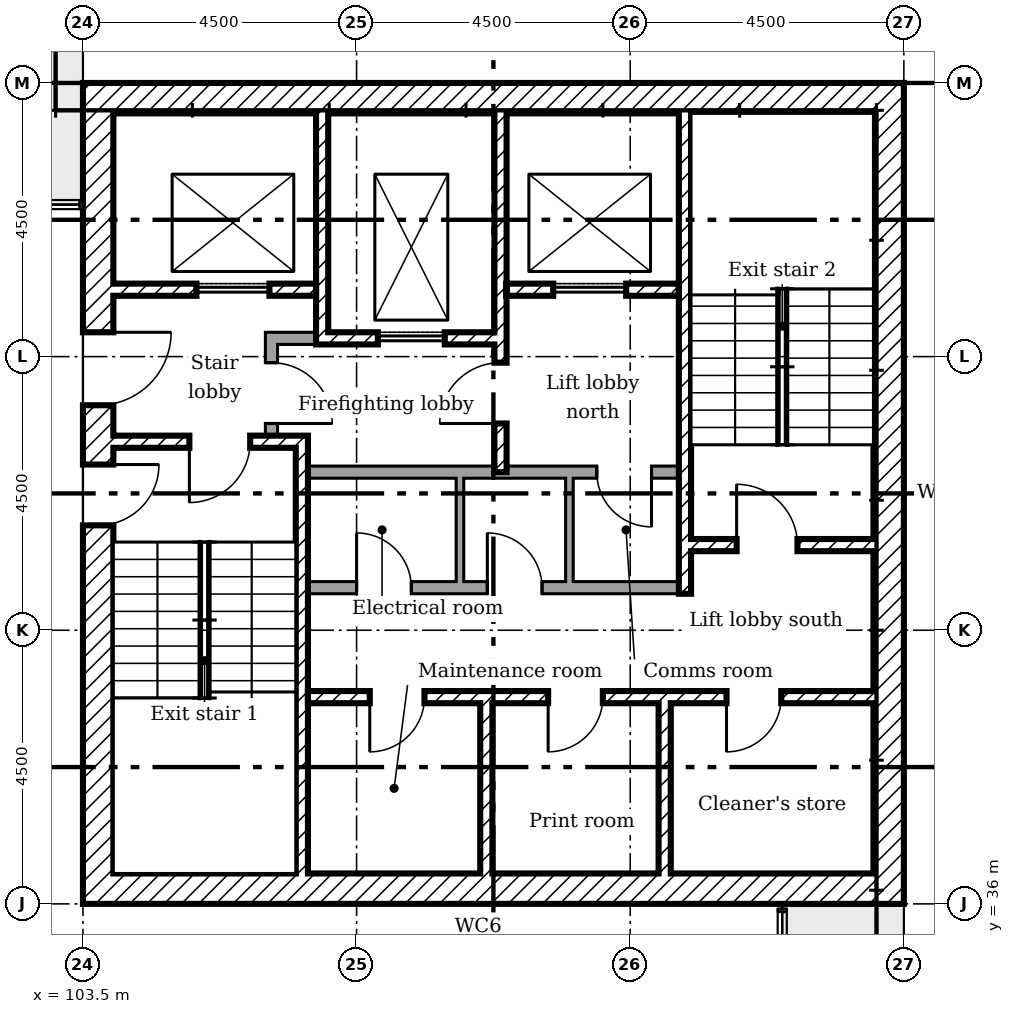
"""IFC4 building model, lengths in metres.
Left out: names, types, materials, properties, quantities, classifications, styles, units other than length and angle.
Written with IfcOpenShell. Run it as: python <this file> out.ifc"""

import sys

from ifc_helpers import new_model, si_unit, direction, frame, frame_2d, origin, place, context, subcontext, project, spatial, rectangle, extrude, element, fill, save


model = new_model("IFC4")
c1 = context("Model", 3, precision=1e-05, world=origin(), true_north=direction((0.0, 1.0)))
c2 = subcontext(c1, "Body", "Model", "MODEL_VIEW")
j1 = project(units=[si_unit("LENGTHUNIT", "METRE"), si_unit("PLANEANGLEUNIT", "RADIAN")], contexts=[c1])
p1 = place(None, origin())
s1 = spatial("IfcSite", under=j1, at=p1, CompositionType="ELEMENT")
p2 = place(p1, origin())
s2 = spatial("IfcBuilding", under=s1, at=p2, CompositionType="ELEMENT")
p3 = place(p2, frame((0.0, 0.0, 199.2)))
s3 = spatial("IfcBuildingStorey", under=s2, at=p3, CompositionType="ELEMENT", Elevation=199.2)
p4 = place(p3, frame((116.75, 36.0, 0.0), z_axis=(0.0, 0.0, 1.0), x_axis=(0.0, 1.0, 0.0)))
e1 = element("IfcWall", 1, at=p4, inside=s3, PredefinedType="SHEAR", context=c2, shape_type="SweptSolid", body=[
    extrude(rectangle(XDim=13.5, YDim=0.5, at=frame_2d((6.75, 0.0))), origin(), (0.0, 0.0, 1.0), 3.35),
])
for number, where in (
    (2, (103.5, 49.25, 0.0)),
    (3, (103.5, 36.25, 0.0)),
):
    element("IfcWall", number, at=place(p3, frame(where)), inside=s3, PredefinedType="SHEAR", context=c2, shape_type="SweptSolid", body=[
        extrude(rectangle(XDim=13.0, YDim=0.5, at=frame_2d((6.5, 0.0))), origin(), (0.0, 0.0, 1.0), 3.35),
    ])
p5 = place(p3, frame((103.75, 36.5, 0.0), z_axis=(0.0, 0.0, 1.0), x_axis=(0.0, 1.0, 0.0)))
e4 = element("IfcWall", 4, at=p5, inside=s3, PredefinedType="SHEAR", context=c2, shape_type="SweptSolid", body=[
    extrude(rectangle(XDim=12.5, YDim=0.5, at=frame_2d((6.25, 0.0))), origin(), (0.0, 0.0, 1.0), 3.35),
])
p6 = place(p5, frame((7.7, 0.0, 0.0)))
e5 = element("IfcOpeningElement", 5, at=p6, cuts=e4, PredefinedType="OPENING", context=c2, shape_type="SweptSolid", body=[
    extrude(rectangle(XDim=1.2, YDim=2.1, at=frame_2d((0.6, 1.05))), frame((0.0, 0.26, 0.0), z_axis=(0.0, -1.0, 0.0), x_axis=(1.0, 0.0, 0.0)), (0.0, 0.0, 1.0), 0.52),
])
p7 = place(p5, frame((5.725, 0.0, 0.0)))
e6 = element("IfcOpeningElement", 6, at=p7, cuts=e4, PredefinedType="OPENING", context=c2, shape_type="SweptSolid", body=[
    extrude(rectangle(XDim=1.0, YDim=2.1, at=frame_2d((0.5, 1.05))), frame((0.0, 0.26, 0.0), z_axis=(0.0, -1.0, 0.0), x_axis=(1.0, 0.0, 0.0)), (0.0, 0.0, 1.0), 0.52),
])
p8 = place(p3, frame((107.433, 49.0, 0.0), z_axis=(0.0, 0.0, 1.0), x_axis=(0.0, -1.0, 0.0)))
e7 = element("IfcWall", 7, at=p8, inside=s3, PredefinedType="SHEAR", context=c2, shape_type="SweptSolid", body=[
    extrude(rectangle(XDim=3.8, YDim=0.2, at=frame_2d((1.9, 0.0))), origin(), (0.0, 0.0, 1.0), 3.35),
])
p9 = place(p3, frame((110.367, 49.0, 0.0), z_axis=(0.0, 0.0, 1.0), x_axis=(0.0, -1.0, 0.0)))
e8 = element("IfcWall", 8, at=p9, inside=s3, PredefinedType="SHEAR", context=c2, shape_type="SweptSolid", body=[
    extrude(rectangle(XDim=5.9, YDim=0.2, at=frame_2d((2.95, 0.0))), origin(), (0.0, 0.0, 1.0), 3.35),
])
p10 = place(p9, frame((4.1, 0.0, 0.0)))
e9 = element("IfcOpeningElement", 9, at=p10, cuts=e8, PredefinedType="OPENING", context=c2, shape_type="SweptSolid", body=[
    extrude(rectangle(XDim=1.0, YDim=2.1, at=frame_2d((0.5, 1.05))), frame((0.0, 0.11, 0.0), z_axis=(0.0, -1.0, 0.0), x_axis=(1.0, 0.0, 0.0)), (0.0, 0.0, 1.0), 0.22),
])
for number, where, z_axis, x_axis in (
    (10, (110.133, 36.5, 0.0), (0.0, 0.0, 1.0), (0.0, 1.0, 0.0)),
    (11, (113.067, 36.5, 0.0), (0.0, 0.0, 1.0), (0.0, 1.0, 0.0)),
):
    element("IfcWall", number, at=place(p3, frame(where, z_axis=z_axis, x_axis=x_axis)), inside=s3, PredefinedType="SHEAR", context=c2, shape_type="SweptSolid", body=[
        extrude(rectangle(XDim=2.8, YDim=0.2, at=frame_2d((1.4, 0.0))), origin(), (0.0, 0.0, 1.0), 3.35),
    ])
p11 = place(p3, frame((106.5, 45.3, 0.0)))
e12 = element("IfcWall", 12, at=p11, inside=s3, PredefinedType="PARTITIONING", context=c2, shape_type="SweptSolid", body=[
    extrude(rectangle(XDim=0.833, YDim=0.2, at=frame_2d((0.417, 0.0))), origin(), (0.0, 0.0, 1.0), 3.35),
])
p12 = place(p3, frame((106.6, 43.7, 0.0), z_axis=(0.0, 0.0, 1.0), x_axis=(0.0, 1.0, 0.0)))
e13 = element("IfcWall", 13, at=p12, inside=s3, PredefinedType="PARTITIONING", context=c2, shape_type="SweptSolid", body=[
    extrude(rectangle(XDim=1.5, YDim=0.2, at=frame_2d((0.75, 0.0))), origin(), (0.0, 0.0, 1.0), 3.35),
])
p13 = place(p12, frame((0.2, 0.0, 0.0)))
e14 = element("IfcOpeningElement", 14, at=p13, cuts=e13, PredefinedType="OPENING", context=c2, shape_type="SweptSolid", body=[
    extrude(rectangle(XDim=1.0, YDim=2.1, at=frame_2d((0.5, 1.05))), frame((0.0, 0.11, 0.0), z_axis=(0.0, -1.0, 0.0), x_axis=(1.0, 0.0, 0.0)), (0.0, 0.0, 1.0), 0.22),
])
p14 = place(p3, frame((104.0, 46.1, 0.0)))
e15 = element("IfcWall", 15, at=p14, inside=s3, PredefinedType="SHEAR", context=c2, shape_type="SweptSolid", body=[
    extrude(rectangle(XDim=3.333, YDim=0.2, at=frame_2d((1.667, 0.0))), origin(), (0.0, 0.0, 1.0), 3.35),
])
p15 = place(p14, frame((1.367, 0.0, 0.0)))
e16 = element("IfcOpeningElement", 16, at=p15, cuts=e15, PredefinedType="OPENING", context=c2, shape_type="SweptSolid", body=[
    extrude(rectangle(XDim=1.2, YDim=2.1, at=frame_2d((0.6, 1.05))), frame((0.0, 0.11, 0.0), z_axis=(0.0, -1.0, 0.0), x_axis=(1.0, 0.0, 0.0)), (0.0, 0.0, 1.0), 0.22),
])
p16 = place(p3, frame((110.467, 46.1, 0.0)))
e17 = element("IfcWall", 17, at=p16, inside=s3, PredefinedType="SHEAR", context=c2, shape_type="SweptSolid", body=[
    extrude(rectangle(XDim=2.833, YDim=0.2, at=frame_2d((1.417, 0.0))), origin(), (0.0, 0.0, 1.0), 3.35),
])
p17 = place(p16, frame((0.767, 0.0, 0.0)))
e18 = element("IfcOpeningElement", 18, at=p17, cuts=e17, PredefinedType="OPENING", context=c2, shape_type="SweptSolid", body=[
    extrude(rectangle(XDim=1.2, YDim=2.1, at=frame_2d((0.6, 1.05))), frame((0.0, 0.11, 0.0), z_axis=(0.0, -1.0, 0.0), x_axis=(1.0, 0.0, 0.0)), (0.0, 0.0, 1.0), 0.22),
])
p18 = place(p3, frame((107.533, 45.3, 0.0)))
e19 = element("IfcWall", 19, at=p18, inside=s3, PredefinedType="SHEAR", context=c2, shape_type="SweptSolid", body=[
    extrude(rectangle(XDim=2.733, YDim=0.2, at=frame_2d((1.367, 0.0))), origin(), (0.0, 0.0, 1.0), 3.35),
])
p19 = place(p18, frame((0.817, 0.0, 0.0)))
e20 = element("IfcOpeningElement", 20, at=p19, cuts=e19, PredefinedType="OPENING", context=c2, shape_type="SweptSolid", body=[
    extrude(rectangle(XDim=1.1, YDim=2.1, at=frame_2d((0.55, 1.05))), frame((0.0, 0.11, 0.0), z_axis=(0.0, -1.0, 0.0), x_axis=(1.0, 0.0, 0.0)), (0.0, 0.0, 1.0), 0.22),
])
p20 = place(p3, frame((107.2, 39.4, 0.0)))
e21 = element("IfcWall", 21, at=p20, inside=s3, PredefinedType="SHEAR", context=c2, shape_type="SweptSolid", body=[
    extrude(rectangle(XDim=9.3, YDim=0.2, at=frame_2d((4.65, 0.0))), origin(), (0.0, 0.0, 1.0), 3.35),
])
p21 = place(p20, frame((1.017, 0.0, 0.0)))
e22 = element("IfcOpeningElement", 22, at=p21, cuts=e21, PredefinedType="OPENING", context=c2, shape_type="SweptSolid", body=[
    extrude(rectangle(XDim=0.9, YDim=2.1, at=frame_2d((0.45, 1.05))), frame((0.0, 0.11, 0.0), z_axis=(0.0, -1.0, 0.0), x_axis=(1.0, 0.0, 0.0)), (0.0, 0.0, 1.0), 0.22),
])
p22 = place(p20, frame((3.95, 0.0, 0.0)))
e23 = element("IfcOpeningElement", 23, at=p22, cuts=e21, PredefinedType="OPENING", context=c2, shape_type="SweptSolid", body=[
    extrude(rectangle(XDim=0.9, YDim=2.1, at=frame_2d((0.45, 1.05))), frame((0.0, 0.11, 0.0), z_axis=(0.0, -1.0, 0.0), x_axis=(1.0, 0.0, 0.0)), (0.0, 0.0, 1.0), 0.22),
])
p23 = place(p20, frame((6.883, 0.0, 0.0)))
e24 = element("IfcOpeningElement", 24, at=p23, cuts=e21, PredefinedType="OPENING", context=c2, shape_type="SweptSolid", body=[
    extrude(rectangle(XDim=0.9, YDim=2.1, at=frame_2d((0.45, 1.05))), frame((0.0, 0.11, 0.0), z_axis=(0.0, -1.0, 0.0), x_axis=(1.0, 0.0, 0.0)), (0.0, 0.0, 1.0), 0.22),
])
p24 = place(p3, frame((107.1, 36.5, 0.0), z_axis=(0.0, 0.0, 1.0), x_axis=(0.0, 1.0, 0.0)))
e25 = element("IfcWall", 25, at=p24, inside=s3, PredefinedType="SHEAR", context=c2, shape_type="SweptSolid", body=[
    extrude(rectangle(XDim=7.2, YDim=0.2, at=frame_2d((3.6, 0.0))), origin(), (0.0, 0.0, 1.0), 3.35),
])
p25 = place(p3, frame((104.0, 43.6, 0.0)))
e26 = element("IfcWall", 26, at=p25, inside=s3, PredefinedType="SHEAR", context=c2, shape_type="SweptSolid", body=[
    extrude(rectangle(XDim=3.0, YDim=0.2, at=frame_2d((1.5, 0.0))), origin(), (0.0, 0.0, 1.0), 3.35),
])
p26 = place(p25, frame((1.25, 0.0, 0.0)))
e27 = element("IfcOpeningElement", 27, at=p26, cuts=e26, PredefinedType="OPENING", context=c2, shape_type="SweptSolid", body=[
    extrude(rectangle(XDim=1.0, YDim=2.1, at=frame_2d((0.5, 1.05))), frame((0.0, 0.11, 0.0), z_axis=(0.0, -1.0, 0.0), x_axis=(1.0, 0.0, 0.0)), (0.0, 0.0, 1.0), 0.22),
])
p27 = place(p3, frame((113.5, 41.9, 0.0)))
e28 = element("IfcWall", 28, at=p27, inside=s3, PredefinedType="SHEAR", context=c2, shape_type="SweptSolid", body=[
    extrude(rectangle(XDim=3.0, YDim=0.2, at=frame_2d((1.5, 0.0))), origin(), (0.0, 0.0, 1.0), 3.35),
])
p28 = place(p27, frame((0.75, 0.0, 0.0)))
e29 = element("IfcOpeningElement", 29, at=p28, cuts=e28, PredefinedType="OPENING", context=c2, shape_type="SweptSolid", body=[
    extrude(rectangle(XDim=1.0, YDim=2.1, at=frame_2d((0.5, 1.05))), frame((0.0, 0.11, 0.0), z_axis=(0.0, -1.0, 0.0), x_axis=(1.0, 0.0, 0.0)), (0.0, 0.0, 1.0), 0.22),
])
p29 = place(p3, frame((113.4, 41.1, 0.0), z_axis=(0.0, 0.0, 1.0), x_axis=(0.0, 1.0, 0.0)))
e30 = element("IfcWall", 30, at=p29, inside=s3, PredefinedType="SHEAR", context=c2, shape_type="SweptSolid", body=[
    extrude(rectangle(XDim=7.9, YDim=0.2, at=frame_2d((3.95, 0.0))), origin(), (0.0, 0.0, 1.0), 3.35),
])
p30 = place(p3, frame((107.2, 43.1, 0.0)))
e31 = element("IfcWall", 31, at=p30, inside=s3, PredefinedType="PARTITIONING", context=c2, shape_type="SweptSolid", body=[
    extrude(rectangle(XDim=6.1, YDim=0.2, at=frame_2d((3.05, 0.0))), origin(), (0.0, 0.0, 1.0), 3.35),
])
p31 = place(p30, frame((4.75, 0.0, 0.0)))
e32 = element("IfcOpeningElement", 32, at=p31, cuts=e31, PredefinedType="OPENING", context=c2, shape_type="SweptSolid", body=[
    extrude(rectangle(XDim=0.9, YDim=2.1, at=frame_2d((0.45, 1.05))), frame((0.0, 0.11, 0.0), z_axis=(0.0, -1.0, 0.0), x_axis=(1.0, 0.0, 0.0)), (0.0, 0.0, 1.0), 0.22),
])
p32 = place(p3, frame((107.2, 41.2, 0.0)))
e33 = element("IfcWall", 33, at=p32, inside=s3, PredefinedType="PARTITIONING", context=c2, shape_type="SweptSolid", body=[
    extrude(rectangle(XDim=6.1, YDim=0.2, at=frame_2d((3.05, 0.0))), origin(), (0.0, 0.0, 1.0), 3.35),
])
p33 = place(p32, frame((0.8, 0.0, 0.0)))
e34 = element("IfcOpeningElement", 34, at=p33, cuts=e33, PredefinedType="OPENING", context=c2, shape_type="SweptSolid", body=[
    extrude(rectangle(XDim=0.9, YDim=2.1, at=frame_2d((0.45, 1.05))), frame((0.0, 0.11, 0.0), z_axis=(0.0, -1.0, 0.0), x_axis=(1.0, 0.0, 0.0)), (0.0, 0.0, 1.0), 0.22),
])
p34 = place(p32, frame((2.95, 0.0, 0.0)))
e35 = element("IfcOpeningElement", 35, at=p34, cuts=e33, PredefinedType="OPENING", context=c2, shape_type="SweptSolid", body=[
    extrude(rectangle(XDim=0.9, YDim=2.1, at=frame_2d((0.45, 1.05))), frame((0.0, 0.11, 0.0), z_axis=(0.0, -1.0, 0.0), x_axis=(1.0, 0.0, 0.0)), (0.0, 0.0, 1.0), 0.22),
])
for number, where, z_axis, x_axis in (
    (36, (109.7, 41.3, 0.0), (0.0, 0.0, 1.0), (0.0, 1.0, 0.0)),
    (37, (111.5, 41.3, 0.0), (0.0, 0.0, 1.0), (0.0, 1.0, 0.0)),
):
    element("IfcWall", number, at=place(p3, frame(where, z_axis=z_axis, x_axis=x_axis)), inside=s3, PredefinedType="PARTITIONING", context=c2, shape_type="SweptSolid", body=[
        extrude(rectangle(XDim=1.7, YDim=0.125, at=frame_2d((0.85, 0.0))), origin(), (0.0, 0.0, 1.0), 3.35),
    ])
p35 = place(p6, frame((1.2, 0.0, 0.0), x_axis=(-1.0, 0.0, 0.0)))
e38 = element("IfcDoor", 38, at=p35, inside=s3, OperationType="SINGLE_SWING_RIGHT", PredefinedType="DOOR", context=c2, shape_type="SweptSolid", body=[
    extrude(rectangle(XDim=1.2, YDim=2.1, at=frame_2d((0.6, 1.05))), frame((0.0, 0.025, 0.0), z_axis=(0.0, -1.0, 0.0), x_axis=(1.0, 0.0, 0.0)), (0.0, 0.0, 1.0), 0.05),
])
fill(e5, e38)
p36 = place(p26, frame((1.0, 0.0, 0.0), x_axis=(-1.0, 0.0, 0.0)))
e39 = element("IfcDoor", 39, at=p36, inside=s3, OperationType="SINGLE_SWING_LEFT", PredefinedType="DOOR", context=c2, shape_type="SweptSolid", body=[
    extrude(rectangle(XDim=1.0, YDim=2.1, at=frame_2d((0.5, 1.05))), frame((0.0, 0.025, 0.0), z_axis=(0.0, -1.0, 0.0), x_axis=(1.0, 0.0, 0.0)), (0.0, 0.0, 1.0), 0.05),
])
fill(e27, e39)
p37 = place(p7, frame((1.0, 0.0, 0.0), x_axis=(-1.0, 0.0, 0.0)))
e40 = element("IfcDoor", 40, at=p37, inside=s3, OperationType="SINGLE_SWING_RIGHT", PredefinedType="DOOR", context=c2, shape_type="SweptSolid", body=[
    extrude(rectangle(XDim=1.0, YDim=2.1, at=frame_2d((0.5, 1.05))), frame((0.0, 0.025, 0.0), z_axis=(0.0, -1.0, 0.0), x_axis=(1.0, 0.0, 0.0)), (0.0, 0.0, 1.0), 0.05),
])
fill(e6, e40)
p38 = place(p28, origin())
e41 = element("IfcDoor", 41, at=p38, inside=s3, OperationType="SINGLE_SWING_RIGHT", PredefinedType="DOOR", context=c2, shape_type="SweptSolid", body=[
    extrude(rectangle(XDim=1.0, YDim=2.1, at=frame_2d((0.5, 1.05))), frame((0.0, 0.025, 0.0), z_axis=(0.0, -1.0, 0.0), x_axis=(1.0, 0.0, 0.0)), (0.0, 0.0, 1.0), 0.05),
])
fill(e29, e41)
p39 = place(p10, frame((1.0, 0.0, 0.0), x_axis=(-1.0, 0.0, 0.0)))
e42 = element("IfcDoor", 42, at=p39, inside=s3, OperationType="SINGLE_SWING_RIGHT", PredefinedType="DOOR", context=c2, shape_type="SweptSolid", body=[
    extrude(rectangle(XDim=1.0, YDim=2.1, at=frame_2d((0.5, 1.05))), frame((0.0, 0.025, 0.0), z_axis=(0.0, -1.0, 0.0), x_axis=(1.0, 0.0, 0.0)), (0.0, 0.0, 1.0), 0.05),
])
fill(e9, e42)
p40 = place(p13, frame((1.0, 0.0, 0.0), x_axis=(-1.0, 0.0, 0.0)))
e43 = element("IfcDoor", 43, at=p40, inside=s3, OperationType="SINGLE_SWING_LEFT", PredefinedType="DOOR", context=c2, shape_type="SweptSolid", body=[
    extrude(rectangle(XDim=1.0, YDim=2.1, at=frame_2d((0.5, 1.05))), frame((0.0, 0.025, 0.0), z_axis=(0.0, -1.0, 0.0), x_axis=(1.0, 0.0, 0.0)), (0.0, 0.0, 1.0), 0.05),
])
fill(e14, e43)
p41 = place(p21, frame((0.9, 0.0, 0.0), x_axis=(-1.0, 0.0, 0.0)))
e44 = element("IfcDoor", 44, at=p41, inside=s3, OperationType="SINGLE_SWING_LEFT", PredefinedType="DOOR", context=c2, shape_type="SweptSolid", body=[
    extrude(rectangle(XDim=0.9, YDim=2.1, at=frame_2d((0.45, 1.05))), frame((0.0, 0.025, 0.0), z_axis=(0.0, -1.0, 0.0), x_axis=(1.0, 0.0, 0.0)), (0.0, 0.0, 1.0), 0.05),
])
fill(e22, e44)
p42 = place(p22, frame((0.9, 0.0, 0.0), x_axis=(-1.0, 0.0, 0.0)))
e45 = element("IfcDoor", 45, at=p42, inside=s3, OperationType="SINGLE_SWING_LEFT", PredefinedType="DOOR", context=c2, shape_type="SweptSolid", body=[
    extrude(rectangle(XDim=0.9, YDim=2.1, at=frame_2d((0.45, 1.05))), frame((0.0, 0.025, 0.0), z_axis=(0.0, -1.0, 0.0), x_axis=(1.0, 0.0, 0.0)), (0.0, 0.0, 1.0), 0.05),
])
fill(e23, e45)
p43 = place(p23, frame((0.9, 0.0, 0.0), x_axis=(-1.0, 0.0, 0.0)))
e46 = element("IfcDoor", 46, at=p43, inside=s3, OperationType="SINGLE_SWING_LEFT", PredefinedType="DOOR", context=c2, shape_type="SweptSolid", body=[
    extrude(rectangle(XDim=0.9, YDim=2.1, at=frame_2d((0.45, 1.05))), frame((0.0, 0.025, 0.0), z_axis=(0.0, -1.0, 0.0), x_axis=(1.0, 0.0, 0.0)), (0.0, 0.0, 1.0), 0.05),
])
fill(e24, e46)
p44 = place(p33, origin())
e47 = element("IfcDoor", 47, at=p44, inside=s3, OperationType="SINGLE_SWING_RIGHT", PredefinedType="DOOR", context=c2, shape_type="SweptSolid", body=[
    extrude(rectangle(XDim=0.9, YDim=2.1, at=frame_2d((0.45, 1.05))), frame((0.0, 0.025, 0.0), z_axis=(0.0, -1.0, 0.0), x_axis=(1.0, 0.0, 0.0)), (0.0, 0.0, 1.0), 0.05),
])
fill(e34, e47)
p45 = place(p34, origin())
e48 = element("IfcDoor", 48, at=p45, inside=s3, OperationType="SINGLE_SWING_RIGHT", PredefinedType="DOOR", context=c2, shape_type="SweptSolid", body=[
    extrude(rectangle(XDim=0.9, YDim=2.1, at=frame_2d((0.45, 1.05))), frame((0.0, 0.025, 0.0), z_axis=(0.0, -1.0, 0.0), x_axis=(1.0, 0.0, 0.0)), (0.0, 0.0, 1.0), 0.05),
])
fill(e35, e48)
p46 = place(p31, frame((0.9, 0.0, 0.0), x_axis=(-1.0, 0.0, 0.0)))
e49 = element("IfcDoor", 49, at=p46, inside=s3, OperationType="SINGLE_SWING_RIGHT", PredefinedType="DOOR", context=c2, shape_type="SweptSolid", body=[
    extrude(rectangle(XDim=0.9, YDim=2.1, at=frame_2d((0.45, 1.05))), frame((0.0, 0.025, 0.0), z_axis=(0.0, -1.0, 0.0), x_axis=(1.0, 0.0, 0.0)), (0.0, 0.0, 1.0), 0.05),
])
fill(e32, e49)
p47 = place(p19, origin())
e50 = element("IfcDoor", 50, at=p47, inside=s3, OperationType="SLIDING_TO_LEFT", PredefinedType="DOOR", context=c2, shape_type="SweptSolid", body=[
    extrude(rectangle(XDim=1.1, YDim=2.1, at=frame_2d((0.55, 1.05))), frame((0.0, 0.025, 0.0), z_axis=(0.0, -1.0, 0.0), x_axis=(1.0, 0.0, 0.0)), (0.0, 0.0, 1.0), 0.05),
])
fill(e20, e50)
p48 = place(p15, origin())
e51 = element("IfcDoor", 51, at=p48, inside=s3, OperationType="SLIDING_TO_LEFT", PredefinedType="DOOR", context=c2, shape_type="SweptSolid", body=[
    extrude(rectangle(XDim=1.2, YDim=2.1, at=frame_2d((0.6, 1.05))), frame((0.0, 0.025, 0.0), z_axis=(0.0, -1.0, 0.0), x_axis=(1.0, 0.0, 0.0)), (0.0, 0.0, 1.0), 0.05),
])
fill(e16, e51)
p49 = place(p17, origin())
e52 = element("IfcDoor", 52, at=p49, inside=s3, OperationType="SLIDING_TO_LEFT", PredefinedType="DOOR", context=c2, shape_type="SweptSolid", body=[
    extrude(rectangle(XDim=1.2, YDim=2.1, at=frame_2d((0.6, 1.05))), frame((0.0, 0.025, 0.0), z_axis=(0.0, -1.0, 0.0), x_axis=(1.0, 0.0, 0.0)), (0.0, 0.0, 1.0), 0.05),
])
fill(e18, e52)
save(model, sys.argv[1])
